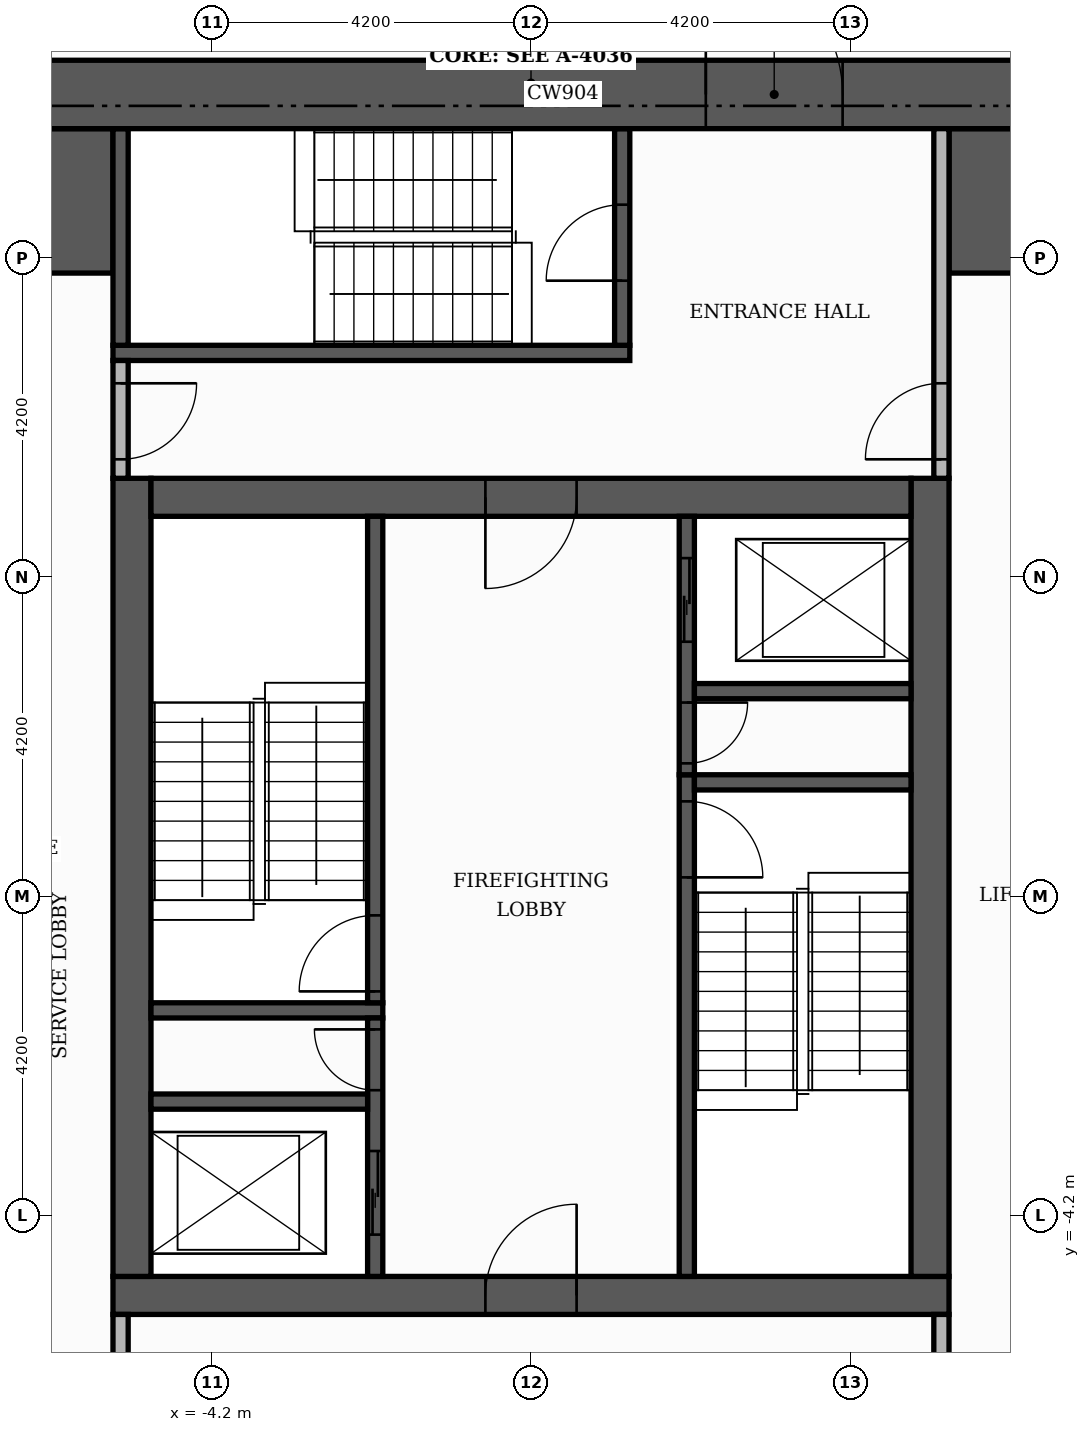
"""IFC4 building model, lengths in metres.
Left out: names, types, materials, properties, quantities, classifications, styles, units other than length and angle.
Written with IfcOpenShell. Run it as: python <this file> out.ifc"""

import sys

from ifc_helpers import new_model, si_unit, direction, frame, frame_2d, origin, place, context, subcontext, project, spatial, rectangle, extrude, element, fill, save


model = new_model("IFC4")
c1 = context("Model", 3, precision=1e-05, world=origin(), true_north=direction((0.0, 1.0)))
c2 = subcontext(c1, "Body", "Model", "MODEL_VIEW")
j1 = project(units=[si_unit("LENGTHUNIT", "METRE"), si_unit("PLANEANGLEUNIT", "RADIAN")], contexts=[c1])
p1 = place(None, origin())
s1 = spatial("IfcSite", under=j1, at=p1, CompositionType="ELEMENT")
p2 = place(p1, origin())
s2 = spatial("IfcBuilding", under=s1, at=p2, CompositionType="ELEMENT")
p3 = place(p2, frame((0.0, 0.0, 215.7)))
s3 = spatial("IfcBuildingStorey", under=s2, at=p3, CompositionType="ELEMENT", Elevation=215.7)
p4 = place(p3, frame((-5.5, -5.25, 0.0), z_axis=(0.0, 0.0, 1.0), x_axis=(1.0, 0.0, 0.0)))
e1 = element("IfcWall", 1, at=p4, inside=s3, PredefinedType="SHEAR", context=c2, shape_type="SweptSolid", body=[
    extrude(rectangle(XDim=11.0, YDim=0.5, at=frame_2d((5.5, 0.0))), origin(), (0.0, 0.0, 1.0), 3.48),
])
p5 = place(p4, frame((4.9, 0.0, 0.0)))
e2 = element("IfcOpeningElement", 2, at=p5, cuts=e1, PredefinedType="OPENING", context=c2, shape_type="SweptSolid", body=[
    extrude(rectangle(XDim=1.2, YDim=2.1, at=frame_2d((0.6, 1.05))), frame((0.0, 0.26, 0.0), z_axis=(0.0, -1.0, 0.0), x_axis=(1.0, 0.0, 0.0)), (0.0, 0.0, 1.0), 0.52),
])
for number, where, z_axis, x_axis in (
    (3, (-5.25, -5.0, 0.0), (0.0, 0.0, 1.0), (0.0, 1.0, 0.0)),
    (4, (5.25, -5.0, 0.0), (0.0, 0.0, 1.0), (0.0, 1.0, 0.0)),
):
    element("IfcWall", number, at=place(p3, frame(where, z_axis=z_axis, x_axis=x_axis)), inside=s3, PredefinedType="SHEAR", context=c2, shape_type="SweptSolid", body=[
        extrude(rectangle(XDim=10.5, YDim=0.5, at=frame_2d((5.25, 0.0))), origin(), (0.0, 0.0, 1.0), 3.48),
    ])
p6 = place(p3, frame((-5.0, 5.25, 0.0), z_axis=(0.0, 0.0, 1.0), x_axis=(1.0, 0.0, 0.0)))
e5 = element("IfcWall", 5, at=p6, inside=s3, PredefinedType="SHEAR", context=c2, shape_type="SweptSolid", body=[
    extrude(rectangle(XDim=10.0, YDim=0.5, at=frame_2d((5.0, 0.0))), origin(), (0.0, 0.0, 1.0), 3.48),
])
p7 = place(p6, frame((4.4, 0.0, 0.0)))
e6 = element("IfcOpeningElement", 6, at=p7, cuts=e5, PredefinedType="OPENING", context=c2, shape_type="SweptSolid", body=[
    extrude(rectangle(XDim=1.2, YDim=2.1, at=frame_2d((0.6, 1.05))), frame((0.0, 0.26, 0.0), z_axis=(0.0, -1.0, 0.0), x_axis=(1.0, 0.0, 0.0)), (0.0, 0.0, 1.0), 0.52),
])
for number, where, z_axis, x_axis in (
    (7, (-10.1, 9.15, 0.0), (0.0, 0.0, 1.0), (1.0, 0.0, 0.0)),
    (8, (5.5, 9.15, 0.0), (0.0, 0.0, 1.0), (1.0, 0.0, 0.0)),
):
    element("IfcWall", number, at=place(p3, frame(where, z_axis=z_axis, x_axis=x_axis)), inside=s3, PredefinedType="SHEAR", context=c2, shape_type="SweptSolid", body=[
        extrude(rectangle(XDim=4.6, YDim=1.9, at=frame_2d((2.3, 0.0))), origin(), (0.0, 0.0, 1.0), 3.48),
    ])
p8 = place(p3, frame((2.05, -5.0, 0.0), z_axis=(0.0, 0.0, 1.0), x_axis=(0.0, 1.0, 0.0)))
e9 = element("IfcWall", 9, at=p8, inside=s3, PredefinedType="SHEAR", context=c2, shape_type="SweptSolid", body=[
    extrude(rectangle(XDim=6.6, YDim=0.2, at=frame_2d((3.3, 0.0))), origin(), (0.0, 0.0, 1.0), 3.48),
])
p9 = place(p8, frame((5.25, 0.0, 0.0)))
e10 = element("IfcOpeningElement", 10, at=p9, cuts=e9, PredefinedType="OPENING", context=c2, shape_type="SweptSolid", body=[
    extrude(rectangle(XDim=1.0, YDim=2.1, at=frame_2d((0.5, 1.05))), frame((0.0, 0.11, 0.0), z_axis=(0.0, -1.0, 0.0), x_axis=(1.0, 0.0, 0.0)), (0.0, 0.0, 1.0), 0.22),
])
p10 = place(p3, frame((-5.0, -1.5, 0.0), z_axis=(0.0, 0.0, 1.0), x_axis=(1.0, 0.0, 0.0)))
e11 = element("IfcWall", 11, at=p10, inside=s3, PredefinedType="SHEAR", context=c2, shape_type="SweptSolid", body=[
    extrude(rectangle(XDim=3.05, YDim=0.2, at=frame_2d((1.525, 0.0))), origin(), (0.0, 0.0, 1.0), 3.48),
])
p11 = place(p3, frame((-2.05, -1.4, 0.0), z_axis=(0.0, 0.0, 1.0), x_axis=(0.0, 1.0, 0.0)))
e12 = element("IfcWall", 12, at=p11, inside=s3, PredefinedType="SHEAR", context=c2, shape_type="SweptSolid", body=[
    extrude(rectangle(XDim=6.4, YDim=0.2, at=frame_2d((3.2, 0.0))), origin(), (0.0, 0.0, 1.0), 3.48),
])
p12 = place(p11, frame((0.15, 0.0, 0.0)))
e13 = element("IfcOpeningElement", 13, at=p12, cuts=e12, PredefinedType="OPENING", context=c2, shape_type="SweptSolid", body=[
    extrude(rectangle(XDim=1.0, YDim=2.1, at=frame_2d((0.5, 1.05))), frame((0.0, 0.11, 0.0), z_axis=(0.0, -1.0, 0.0), x_axis=(1.0, 0.0, 0.0)), (0.0, 0.0, 1.0), 0.22),
])
p13 = place(p3, frame((2.15, 1.5, 0.0), z_axis=(0.0, 0.0, 1.0), x_axis=(1.0, 0.0, 0.0)))
e14 = element("IfcWall", 14, at=p13, inside=s3, PredefinedType="SHEAR", context=c2, shape_type="SweptSolid", body=[
    extrude(rectangle(XDim=2.85, YDim=0.2, at=frame_2d((1.425, 0.0))), origin(), (0.0, 0.0, 1.0), 3.48),
])
p14 = place(p3, frame((-5.5, 7.15, 0.0), z_axis=(0.0, 0.0, 1.0), x_axis=(1.0, 0.0, 0.0)))
e15 = element("IfcWall", 15, at=p14, inside=s3, PredefinedType="SHEAR", context=c2, shape_type="SweptSolid", body=[
    extrude(rectangle(XDim=6.8, YDim=0.2, at=frame_2d((3.4, 0.0))), origin(), (0.0, 0.0, 1.0), 3.48),
])
p15 = place(p3, frame((-5.4, 7.25, 0.0), z_axis=(0.0, 0.0, 1.0), x_axis=(0.0, 1.0, 0.0)))
e16 = element("IfcWall", 16, at=p15, inside=s3, PredefinedType="SHEAR", context=c2, shape_type="SweptSolid", body=[
    extrude(rectangle(XDim=2.85, YDim=0.2, at=frame_2d((1.425, 0.0))), origin(), (0.0, 0.0, 1.0), 3.48),
])
p16 = place(p3, frame((1.2, 7.25, 0.0), z_axis=(0.0, 0.0, 1.0), x_axis=(0.0, 1.0, 0.0)))
e17 = element("IfcWall", 17, at=p16, inside=s3, PredefinedType="SHEAR", context=c2, shape_type="SweptSolid", body=[
    extrude(rectangle(XDim=2.85, YDim=0.2, at=frame_2d((1.425, 0.0))), origin(), (0.0, 0.0, 1.0), 3.48),
])
p17 = place(p16, frame((0.85, 0.0, 0.0)))
e18 = element("IfcOpeningElement", 18, at=p17, cuts=e17, PredefinedType="OPENING", context=c2, shape_type="SweptSolid", body=[
    extrude(rectangle(XDim=1.0, YDim=2.1, at=frame_2d((0.5, 1.05))), frame((0.0, 0.11, 0.0), z_axis=(0.0, -1.0, 0.0), x_axis=(1.0, 0.0, 0.0)), (0.0, 0.0, 1.0), 0.22),
])
p18 = place(p3, frame((-2.05, -5.0, 0.0), z_axis=(0.0, 0.0, 1.0), x_axis=(0.0, 1.0, 0.0)))
e19 = element("IfcWall", 19, at=p18, inside=s3, PredefinedType="SHEAR", context=c2, shape_type="SweptSolid", body=[
    extrude(rectangle(XDim=3.4, YDim=0.2, at=frame_2d((1.7, 0.0))), origin(), (0.0, 0.0, 1.0), 3.48),
])
p19 = place(p18, frame((0.55, 0.0, 0.0)))
e20 = element("IfcOpeningElement", 20, at=p19, cuts=e19, PredefinedType="OPENING", context=c2, shape_type="SweptSolid", body=[
    extrude(rectangle(XDim=1.1, YDim=2.1, at=frame_2d((0.55, 1.05))), frame((0.0, 0.11, 0.0), z_axis=(0.0, -1.0, 0.0), x_axis=(1.0, 0.0, 0.0)), (0.0, 0.0, 1.0), 0.22),
])
p20 = place(p18, frame((2.45, 0.0, 0.0)))
e21 = element("IfcOpeningElement", 21, at=p20, cuts=e19, PredefinedType="OPENING", context=c2, shape_type="SweptSolid", body=[
    extrude(rectangle(XDim=0.8, YDim=2.1, at=frame_2d((0.4, 1.05))), frame((0.0, 0.11, 0.0), z_axis=(0.0, -1.0, 0.0), x_axis=(1.0, 0.0, 0.0)), (0.0, 0.0, 1.0), 0.22),
])
p21 = place(p3, frame((-5.0, -2.7, 0.0), z_axis=(0.0, 0.0, 1.0), x_axis=(1.0, 0.0, 0.0)))
e22 = element("IfcWall", 22, at=p21, inside=s3, PredefinedType="SHEAR", context=c2, shape_type="SweptSolid", body=[
    extrude(rectangle(XDim=2.85, YDim=0.2, at=frame_2d((1.425, 0.0))), origin(), (0.0, 0.0, 1.0), 3.48),
])
p22 = place(p3, frame((2.05, 1.6, 0.0), z_axis=(0.0, 0.0, 1.0), x_axis=(0.0, 1.0, 0.0)))
e23 = element("IfcWall", 23, at=p22, inside=s3, PredefinedType="SHEAR", context=c2, shape_type="SweptSolid", body=[
    extrude(rectangle(XDim=3.4, YDim=0.2, at=frame_2d((1.7, 0.0))), origin(), (0.0, 0.0, 1.0), 3.48),
])
p23 = place(p22, frame((1.75, 0.0, 0.0)))
e24 = element("IfcOpeningElement", 24, at=p23, cuts=e23, PredefinedType="OPENING", context=c2, shape_type="SweptSolid", body=[
    extrude(rectangle(XDim=1.1, YDim=2.1, at=frame_2d((0.55, 1.05))), frame((0.0, 0.11, 0.0), z_axis=(0.0, -1.0, 0.0), x_axis=(1.0, 0.0, 0.0)), (0.0, 0.0, 1.0), 0.22),
])
p24 = place(p22, frame((0.15, 0.0, 0.0)))
e25 = element("IfcOpeningElement", 25, at=p24, cuts=e23, PredefinedType="OPENING", context=c2, shape_type="SweptSolid", body=[
    extrude(rectangle(XDim=0.8, YDim=2.1, at=frame_2d((0.4, 1.05))), frame((0.0, 0.11, 0.0), z_axis=(0.0, -1.0, 0.0), x_axis=(1.0, 0.0, 0.0)), (0.0, 0.0, 1.0), 0.22),
])
p25 = place(p3, frame((2.15, 2.7, 0.0), z_axis=(0.0, 0.0, 1.0), x_axis=(1.0, 0.0, 0.0)))
e26 = element("IfcWall", 26, at=p25, inside=s3, PredefinedType="SHEAR", context=c2, shape_type="SweptSolid", body=[
    extrude(rectangle(XDim=2.85, YDim=0.2, at=frame_2d((1.425, 0.0))), origin(), (0.0, 0.0, 1.0), 3.48),
])
p26 = place(p3, frame((-11.0, 10.55, 0.0), z_axis=(0.0, 0.0, 1.0), x_axis=(1.0, 0.0, 0.0)))
e27 = element("IfcWall", 27, at=p26, inside=s3, PredefinedType="SHEAR", context=c2, shape_type="SweptSolid", body=[
    extrude(rectangle(XDim=22.0, YDim=0.9, at=frame_2d((11.0, 0.0))), origin(), (0.0, 0.0, 1.0), 3.48),
])
p27 = place(p26, frame((13.3, 0.0, 0.0)))
e28 = element("IfcOpeningElement", 28, at=p27, cuts=e27, PredefinedType="OPENING", context=c2, shape_type="SweptSolid", body=[
    extrude(rectangle(XDim=1.8, YDim=2.2, at=frame_2d((0.9, 1.1))), frame((0.0, 0.46, 0.0), z_axis=(0.0, -1.0, 0.0), x_axis=(1.0, 0.0, 0.0)), (0.0, 0.0, 1.0), 0.92),
])
p28 = place(p3, frame((-5.4, -10.1, 0.0), z_axis=(0.0, 0.0, 1.0), x_axis=(0.0, 1.0, 0.0)))
e29 = element("IfcWall", 29, at=p28, inside=s3, PredefinedType="PARTITIONING", context=c2, shape_type="SweptSolid", body=[
    extrude(rectangle(XDim=4.6, YDim=0.2, at=frame_2d((2.3, 0.0))), origin(), (0.0, 0.0, 1.0), 3.48),
])
p29 = place(p28, frame((2.9, 0.0, 0.0)))
e30 = element("IfcOpeningElement", 30, at=p29, cuts=e29, PredefinedType="OPENING", context=c2, shape_type="SweptSolid", body=[
    extrude(rectangle(XDim=1.0, YDim=2.1, at=frame_2d((0.5, 1.05))), frame((0.0, 0.11, 0.0), z_axis=(0.0, -1.0, 0.0), x_axis=(1.0, 0.0, 0.0)), (0.0, 0.0, 1.0), 0.22),
])
p30 = place(p3, frame((5.4, -10.1, 0.0), z_axis=(0.0, 0.0, 1.0), x_axis=(0.0, 1.0, 0.0)))
e31 = element("IfcWall", 31, at=p30, inside=s3, PredefinedType="PARTITIONING", context=c2, shape_type="SweptSolid", body=[
    extrude(rectangle(XDim=4.6, YDim=0.2, at=frame_2d((2.3, 0.0))), origin(), (0.0, 0.0, 1.0), 3.48),
])
p31 = place(p30, frame((2.9, 0.0, 0.0)))
e32 = element("IfcOpeningElement", 32, at=p31, cuts=e31, PredefinedType="OPENING", context=c2, shape_type="SweptSolid", body=[
    extrude(rectangle(XDim=1.0, YDim=2.1, at=frame_2d((0.5, 1.05))), frame((0.0, 0.11, 0.0), z_axis=(0.0, -1.0, 0.0), x_axis=(1.0, 0.0, 0.0)), (0.0, 0.0, 1.0), 0.22),
])
p32 = place(p3, frame((-5.4, 5.5, 0.0), z_axis=(0.0, 0.0, 1.0), x_axis=(0.0, 1.0, 0.0)))
e33 = element("IfcWall", 33, at=p32, inside=s3, PredefinedType="PARTITIONING", context=c2, shape_type="SweptSolid", body=[
    extrude(rectangle(XDim=1.55, YDim=0.2, at=frame_2d((0.775, 0.0))), origin(), (0.0, 0.0, 1.0), 3.48),
])
p33 = place(p32, frame((0.25, 0.0, 0.0)))
e34 = element("IfcOpeningElement", 34, at=p33, cuts=e33, PredefinedType="OPENING", context=c2, shape_type="SweptSolid", body=[
    extrude(rectangle(XDim=1.0, YDim=2.1, at=frame_2d((0.5, 1.05))), frame((0.0, 0.11, 0.0), z_axis=(0.0, -1.0, 0.0), x_axis=(1.0, 0.0, 0.0)), (0.0, 0.0, 1.0), 0.22),
])
p34 = place(p3, frame((5.4, 5.5, 0.0), z_axis=(0.0, 0.0, 1.0), x_axis=(0.0, 1.0, 0.0)))
e35 = element("IfcWall", 35, at=p34, inside=s3, PredefinedType="PARTITIONING", context=c2, shape_type="SweptSolid", body=[
    extrude(rectangle(XDim=4.6, YDim=0.2, at=frame_2d((2.3, 0.0))), origin(), (0.0, 0.0, 1.0), 3.48),
])
p35 = place(p34, frame((0.25, 0.0, 0.0)))
e36 = element("IfcOpeningElement", 36, at=p35, cuts=e35, PredefinedType="OPENING", context=c2, shape_type="SweptSolid", body=[
    extrude(rectangle(XDim=1.0, YDim=2.1, at=frame_2d((0.5, 1.05))), frame((0.0, 0.11, 0.0), z_axis=(0.0, -1.0, 0.0), x_axis=(1.0, 0.0, 0.0)), (0.0, 0.0, 1.0), 0.22),
])
p36 = place(p23, origin())
e37 = element("IfcDoor", 37, at=p36, inside=s3, OperationType="SLIDING_TO_LEFT", PredefinedType="DOOR", context=c2, shape_type="SweptSolid", body=[
    extrude(rectangle(XDim=1.1, YDim=2.1, at=frame_2d((0.55, 1.05))), frame((0.0, 0.025, 0.0), z_axis=(0.0, -1.0, 0.0), x_axis=(1.0, 0.0, 0.0)), (0.0, 0.0, 1.0), 0.05),
])
fill(e24, e37)
p37 = place(p19, origin())
e38 = element("IfcDoor", 38, at=p37, inside=s3, OperationType="SLIDING_TO_LEFT", PredefinedType="DOOR", context=c2, shape_type="SweptSolid", body=[
    extrude(rectangle(XDim=1.1, YDim=2.1, at=frame_2d((0.55, 1.05))), frame((0.0, 0.025, 0.0), z_axis=(0.0, -1.0, 0.0), x_axis=(1.0, 0.0, 0.0)), (0.0, 0.0, 1.0), 0.05),
])
fill(e20, e38)
p38 = place(p12, origin())
e39 = element("IfcDoor", 39, at=p38, inside=s3, OperationType="SINGLE_SWING_LEFT", PredefinedType="DOOR", context=c2, shape_type="SweptSolid", body=[
    extrude(rectangle(XDim=1.0, YDim=2.1, at=frame_2d((0.5, 1.05))), frame((0.0, 0.025, 0.0), z_axis=(0.0, -1.0, 0.0), x_axis=(1.0, 0.0, 0.0)), (0.0, 0.0, 1.0), 0.05),
])
fill(e13, e39)
p39 = place(p9, frame((1.0, 0.0, 0.0), z_axis=(0.0, 0.0, 1.0), x_axis=(-1.0, 0.0, 0.0)))
e40 = element("IfcDoor", 40, at=p39, inside=s3, OperationType="SINGLE_SWING_LEFT", PredefinedType="DOOR", context=c2, shape_type="SweptSolid", body=[
    extrude(rectangle(XDim=1.0, YDim=2.1, at=frame_2d((0.5, 1.05))), frame((0.0, 0.025, 0.0), z_axis=(0.0, -1.0, 0.0), x_axis=(1.0, 0.0, 0.0)), (0.0, 0.0, 1.0), 0.05),
])
fill(e10, e40)
p40 = place(p24, frame((0.8, 0.0, 0.0), z_axis=(0.0, 0.0, 1.0), x_axis=(-1.0, 0.0, 0.0)))
e41 = element("IfcDoor", 41, at=p40, inside=s3, OperationType="SINGLE_SWING_RIGHT", PredefinedType="DOOR", context=c2, shape_type="SweptSolid", body=[
    extrude(rectangle(XDim=0.8, YDim=2.1, at=frame_2d((0.4, 1.05))), frame((0.0, 0.025, 0.0), z_axis=(0.0, -1.0, 0.0), x_axis=(1.0, 0.0, 0.0)), (0.0, 0.0, 1.0), 0.05),
])
fill(e25, e41)
p41 = place(p20, origin())
e42 = element("IfcDoor", 42, at=p41, inside=s3, OperationType="SINGLE_SWING_RIGHT", PredefinedType="DOOR", context=c2, shape_type="SweptSolid", body=[
    extrude(rectangle(XDim=0.8, YDim=2.1, at=frame_2d((0.4, 1.05))), frame((0.0, 0.025, 0.0), z_axis=(0.0, -1.0, 0.0), x_axis=(1.0, 0.0, 0.0)), (0.0, 0.0, 1.0), 0.05),
])
fill(e21, e42)
p42 = place(p7, frame((1.2, 0.0, 0.0), z_axis=(0.0, 0.0, 1.0), x_axis=(-1.0, 0.0, 0.0)))
e43 = element("IfcDoor", 43, at=p42, inside=s3, OperationType="SINGLE_SWING_LEFT", PredefinedType="DOOR", context=c2, shape_type="SweptSolid", body=[
    extrude(rectangle(XDim=1.2, YDim=2.1, at=frame_2d((0.6, 1.05))), frame((0.0, 0.025, 0.0), z_axis=(0.0, -1.0, 0.0), x_axis=(1.0, 0.0, 0.0)), (0.0, 0.0, 1.0), 0.05),
])
fill(e6, e43)
p43 = place(p5, origin())
e44 = element("IfcDoor", 44, at=p43, inside=s3, OperationType="SINGLE_SWING_RIGHT", PredefinedType="DOOR", context=c2, shape_type="SweptSolid", body=[
    extrude(rectangle(XDim=1.2, YDim=2.1, at=frame_2d((0.6, 1.05))), frame((0.0, 0.025, 0.0), z_axis=(0.0, -1.0, 0.0), x_axis=(1.0, 0.0, 0.0)), (0.0, 0.0, 1.0), 0.05),
])
fill(e2, e44)
p44 = place(p17, origin())
e45 = element("IfcDoor", 45, at=p44, inside=s3, OperationType="SINGLE_SWING_LEFT", PredefinedType="DOOR", context=c2, shape_type="SweptSolid", body=[
    extrude(rectangle(XDim=1.0, YDim=2.1, at=frame_2d((0.5, 1.05))), frame((0.0, 0.025, 0.0), z_axis=(0.0, -1.0, 0.0), x_axis=(1.0, 0.0, 0.0)), (0.0, 0.0, 1.0), 0.05),
])
fill(e18, e45)
p45 = place(p33, frame((1.0, 0.0, 0.0), z_axis=(0.0, 0.0, 1.0), x_axis=(-1.0, 0.0, 0.0)))
e46 = element("IfcDoor", 46, at=p45, inside=s3, OperationType="SINGLE_SWING_RIGHT", PredefinedType="DOOR", context=c2, shape_type="SweptSolid", body=[
    extrude(rectangle(XDim=1.0, YDim=2.1, at=frame_2d((0.5, 1.05))), frame((0.0, 0.025, 0.0), z_axis=(0.0, -1.0, 0.0), x_axis=(1.0, 0.0, 0.0)), (0.0, 0.0, 1.0), 0.05),
])
fill(e34, e46)
p46 = place(p35, origin())
e47 = element("IfcDoor", 47, at=p46, inside=s3, OperationType="SINGLE_SWING_LEFT", PredefinedType="DOOR", context=c2, shape_type="SweptSolid", body=[
    extrude(rectangle(XDim=1.0, YDim=2.1, at=frame_2d((0.5, 1.05))), frame((0.0, 0.025, 0.0), z_axis=(0.0, -1.0, 0.0), x_axis=(1.0, 0.0, 0.0)), (0.0, 0.0, 1.0), 0.05),
])
fill(e36, e47)
p47 = place(p27, origin())
e48 = element("IfcDoor", 48, at=p47, inside=s3, OperationType="DOUBLE_DOOR_SINGLE_SWING", PredefinedType="DOOR", context=c2, shape_type="SweptSolid", body=[
    extrude(rectangle(XDim=1.8, YDim=2.2, at=frame_2d((0.9, 1.1))), frame((0.0, 0.025, 0.0), z_axis=(0.0, -1.0, 0.0), x_axis=(1.0, 0.0, 0.0)), (0.0, 0.0, 1.0), 0.05),
])
fill(e28, e48)
save(model, sys.argv[1])
